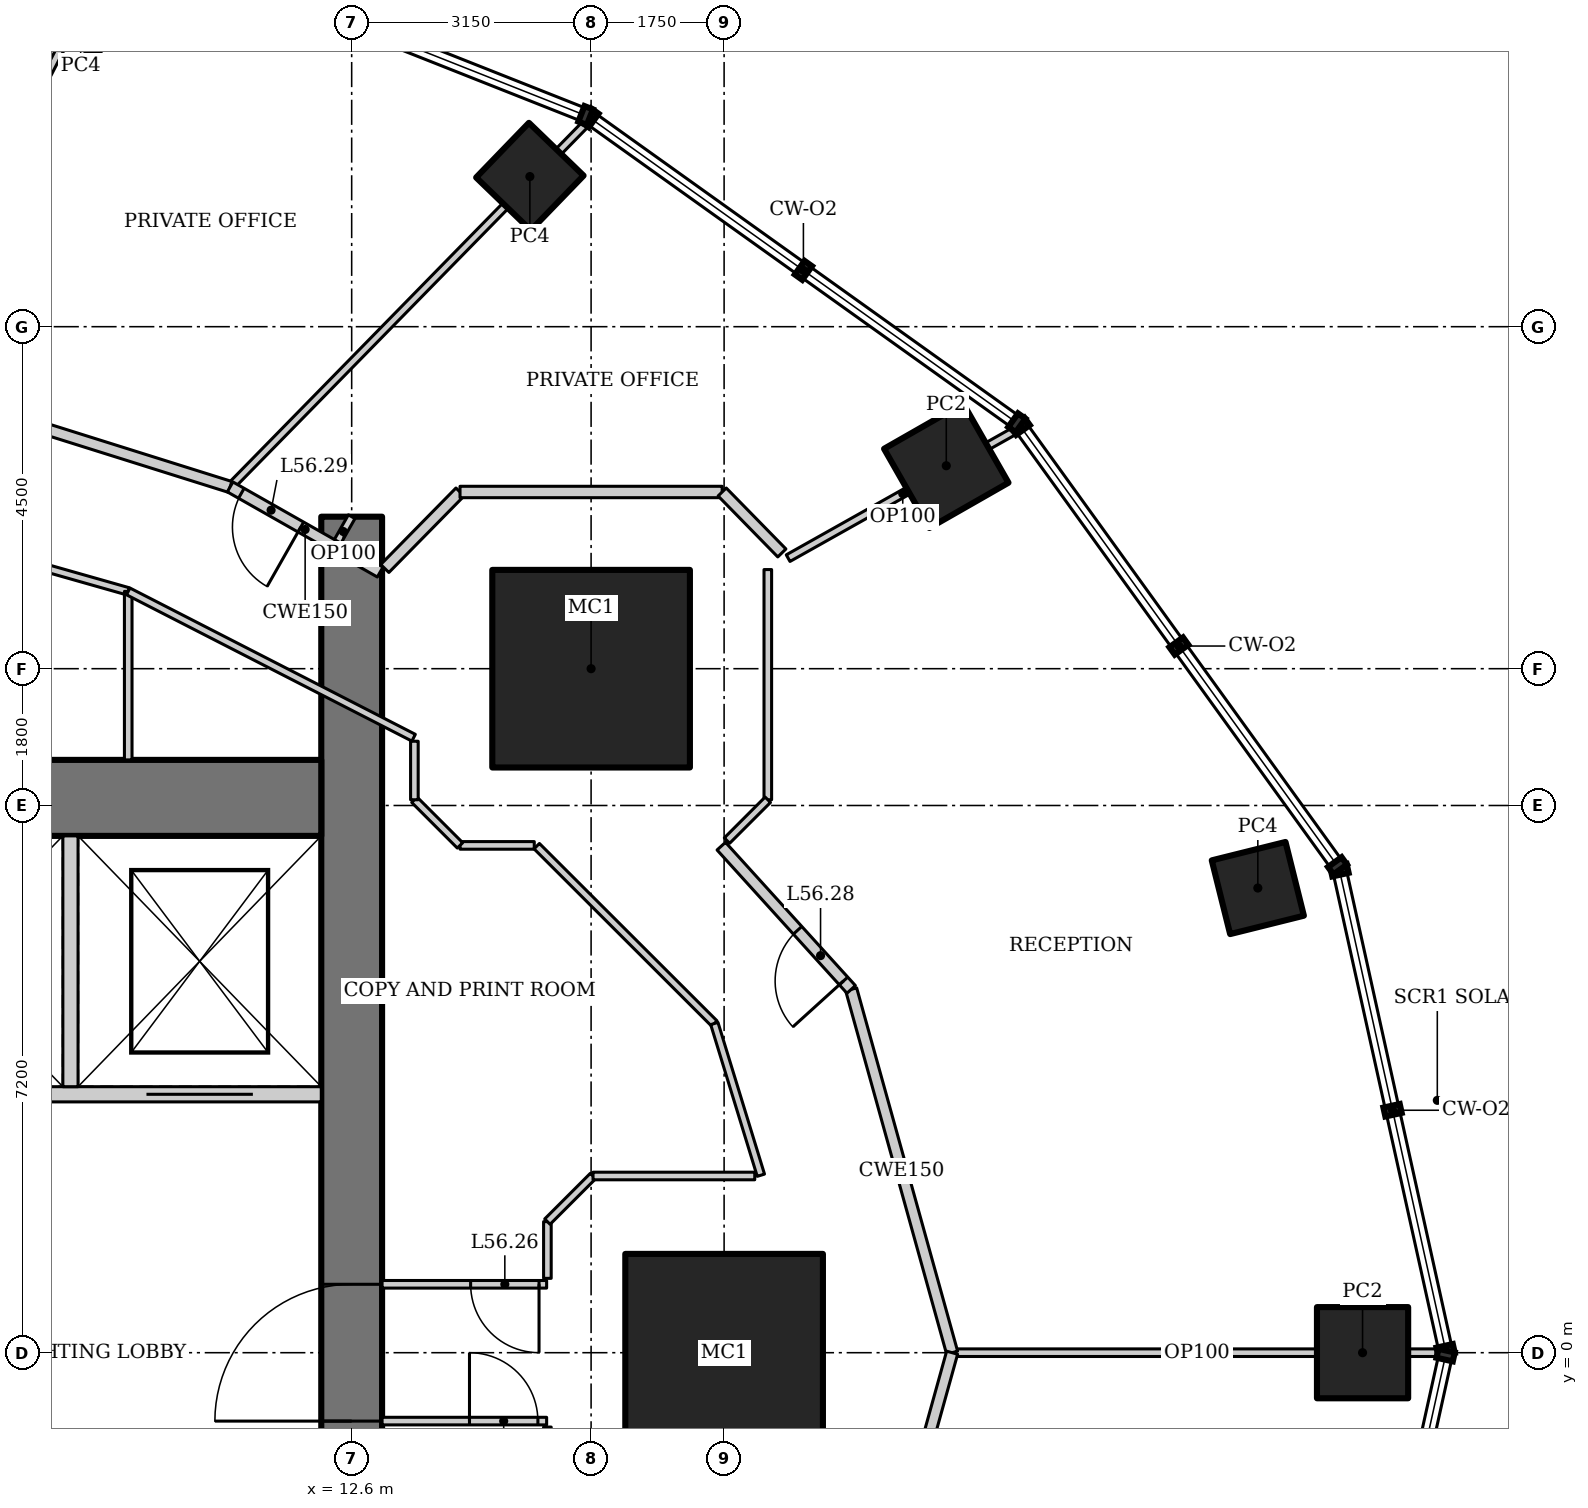
"""IFC4 building model, lengths in metres.
Left out: names, types, materials, properties, quantities, classifications, styles, units other than length and angle.
Written with IfcOpenShell. Run it as: python <this file> out.ifc"""

import sys

from ifc_helpers import new_model, si_unit, direction, frame, frame_2d, origin, origin_2d, place, context, subcontext, project, spatial, rectangle, hollow_rectangle, extrude, element, fill, save


model = new_model("IFC4")
c1 = context("Model", 3, precision=1e-05, world=origin(), true_north=direction((0.0, 1.0)))
c2 = subcontext(c1, "Body", "Model", "MODEL_VIEW")
j1 = project(units=[si_unit("LENGTHUNIT", "METRE"), si_unit("PLANEANGLEUNIT", "RADIAN")], contexts=[c1])
p1 = place(None, origin())
s1 = spatial("IfcSite", under=j1, at=p1, CompositionType="ELEMENT")
p2 = place(p1, origin())
s2 = spatial("IfcBuilding", under=s1, at=p2, CompositionType="ELEMENT")
p3 = place(p2, frame((0.0, 0.0, 241.0)))
s3 = spatial("IfcBuildingStorey", under=s2, at=p3, CompositionType="ELEMENT", Elevation=241.0)
for number, where, z_axis, x_axis in (
    (1, (17.5, 0.0, 0.0), (0.0, 0.0, 1.0), (1.0, 0.0, 0.0)),
    (2, (15.75, 9.0, 0.0), (0.0, 0.0, 1.0), (1.0, 0.0, 0.0)),
):
    element("IfcColumn", number, at=place(p3, frame(where, z_axis=z_axis, x_axis=x_axis)), inside=s3, PredefinedType="COLUMN", context=c2, shape_type="SweptSolid", body=[
        extrude(hollow_rectangle(XDim=2.6, YDim=2.6, WallThickness=0.13, at=origin_2d()), origin(), (0.0, 0.0, 1.0), 4.2),
    ])
p4 = place(p3, frame((25.9, 0.0, 0.0), z_axis=(0.0, 0.0, 1.0), x_axis=(1.0, 0.0, 0.0)))
e3 = element("IfcColumn", 3, at=p4, inside=s3, PredefinedType="COLUMN", context=c2, shape_type="SweptSolid", body=[
    extrude(hollow_rectangle(XDim=1.2, YDim=1.2, WallThickness=0.1, at=origin_2d()), origin(), (0.0, 0.0, 1.0), 4.2),
])
p5 = place(p3, frame((24.522, 6.114, 0.0), z_axis=(0.0, 0.0, 1.0), x_axis=(0.970295726276, 0.2419218956, 0.0)))
e4 = element("IfcColumn", 4, at=p5, inside=s3, PredefinedType="COLUMN", context=c2, shape_type="SweptSolid", body=[
    extrude(hollow_rectangle(XDim=1.0, YDim=1.0, WallThickness=0.08, at=origin_2d()), origin(), (0.0, 0.0, 1.0), 4.2),
])
p6 = place(p3, frame((20.423, 11.67, 0.0), z_axis=(0.0, 0.0, 1.0), x_axis=(0.86824298017, 0.496139221777, 0.0)))
e5 = element("IfcColumn", 5, at=p6, inside=s3, PredefinedType="COLUMN", context=c2, shape_type="SweptSolid", body=[
    extrude(hollow_rectangle(XDim=1.2, YDim=1.2, WallThickness=0.1, at=origin_2d()), origin(), (0.0, 0.0, 1.0), 4.2),
])
for number, where, z_axis, x_axis in (
    (6, (14.944, 15.475, 0.0), (0.0, 0.0, 1.0), (0.695, 0.719, 0.0)),
    (7, (9.035, 17.731, 0.0), (0.0, 0.0, 1.0), (0.454, 0.891, 0.0)),
):
    element("IfcColumn", number, at=place(p3, frame(where, z_axis=z_axis, x_axis=x_axis)), inside=s3, PredefinedType="COLUMN", context=c2, shape_type="SweptSolid", body=[
        extrude(hollow_rectangle(XDim=1.0, YDim=1.0, WallThickness=0.08, at=origin_2d()), origin(), (0.0, 0.0, 1.0), 4.2),
    ])
p7 = place(p3, frame((12.6, -11.0, 0.0), z_axis=(0.0, 0.0, 1.0), x_axis=(0.0, 1.0, 0.0)))
e8 = element("IfcWall", 8, at=p7, inside=s3, PredefinedType="SHEAR", context=c2, shape_type="SweptSolid", body=[
    extrude(rectangle(XDim=22.0, YDim=0.8, at=frame_2d((11.0, 0.0))), origin(), (0.0, 0.0, 1.0), 4.2),
])
p8 = place(p7, frame((10.1, 0.0, 0.0)))
e9 = element("IfcOpeningElement", 9, at=p8, cuts=e8, PredefinedType="OPENING", context=c2, shape_type="SweptSolid", body=[
    extrude(rectangle(XDim=1.8, YDim=2.1, at=frame_2d((0.9, 1.05))), frame((0.0, 0.41, 0.0), z_axis=(0.0, -1.0, 0.0), x_axis=(1.0, 0.0, 0.0)), (0.0, 0.0, 1.0), 0.82),
])
p9 = place(p3, frame((12.2, 7.3, 0.0), z_axis=(0.0, 0.0, 1.0), x_axis=(-1.0, 0.0, 0.0)))
e10 = element("IfcWall", 10, at=p9, inside=s3, PredefinedType="SHEAR", context=c2, shape_type="SweptSolid", body=[
    extrude(rectangle(XDim=6.6, YDim=1.0, at=frame_2d((3.3, 0.0))), origin(), (0.0, 0.0, 1.0), 4.2),
])
p10 = place(p3, frame((12.2, 3.4, 0.0), z_axis=(0.0, 0.0, 1.0), x_axis=(-1.0, 0.0, 0.0)))
e11 = element("IfcWall", 11, at=p10, inside=s3, PredefinedType="SOLIDWALL", context=c2, shape_type="SweptSolid", body=[
    extrude(rectangle(XDim=6.6, YDim=0.2, at=frame_2d((3.3, 0.0))), origin(), (0.0, 0.0, 1.0), 4.2),
])
p11 = place(p10, frame((4.45, 0.0, 0.0)))
e12 = element("IfcOpeningElement", 12, at=p11, cuts=e11, PredefinedType="OPENING", context=c2, shape_type="SweptSolid", body=[
    extrude(rectangle(XDim=1.1, YDim=2.2, at=frame_2d((0.55, 1.1))), frame((0.0, 0.11, 0.0), z_axis=(0.0, -1.0, 0.0), x_axis=(1.0, 0.0, 0.0)), (0.0, 0.0, 1.0), 0.22),
])
p12 = place(p10, frame((0.9, 0.0, 0.0)))
e13 = element("IfcOpeningElement", 13, at=p12, cuts=e11, PredefinedType="OPENING", context=c2, shape_type="SweptSolid", body=[
    extrude(rectangle(XDim=1.4, YDim=2.2, at=frame_2d((0.7, 1.1))), frame((0.0, 0.11, 0.0), z_axis=(0.0, -1.0, 0.0), x_axis=(1.0, 0.0, 0.0)), (0.0, 0.0, 1.0), 0.22),
])
p13 = place(p3, frame((8.9, 3.5, 0.0), z_axis=(0.0, 0.0, 1.0), x_axis=(0.0, 1.0, 0.0)))
e14 = element("IfcWall", 14, at=p13, inside=s3, PredefinedType="SOLIDWALL", context=c2, shape_type="SweptSolid", body=[
    extrude(rectangle(XDim=3.3, YDim=0.2, at=frame_2d((1.65, 0.0))), origin(), (0.0, 0.0, 1.0), 4.2),
])
p14 = place(p3, frame((26.944, 0.0, 0.0), z_axis=(0.0, 0.0, 1.0), x_axis=(-1.0, 0.0, 0.0)))
e15 = element("IfcWall", 15, at=p14, inside=s3, PredefinedType="PARTITIONING", context=c2, shape_type="SweptSolid", body=[
    extrude(rectangle(XDim=6.444, YDim=0.1, at=frame_2d((3.222, 0.0))), origin(), (0.0, 0.0, 1.0), 3.349),
])
p15 = place(p3, frame((15.709, 16.199, 0.0), z_axis=(0.0, 0.0, 1.0), x_axis=(-0.699758297028, -0.71437967898, 0.0)))
e16 = element("IfcWall", 16, at=p15, inside=s3, PredefinedType="PARTITIONING", context=c2, shape_type="SweptSolid", body=[
    extrude(rectangle(XDim=6.729, YDim=0.1, at=frame_2d((3.365, 0.0))), origin(), (0.0, 0.0, 1.0), 3.41),
])
p16 = place(p3, frame((9.54, 18.65, 0.0), z_axis=(0.0, 0.0, 1.0), x_axis=(-0.458420942987, -0.888735190611, 0.0)))
e17 = element("IfcWall", 17, at=p16, inside=s3, PredefinedType="PARTITIONING", context=c2, shape_type="SweptSolid", body=[
    extrude(rectangle(XDim=6.584, YDim=0.1, at=frame_2d((3.292, 0.0))), origin(), (0.0, 0.0, 1.0), 3.108),
])
p17 = place(p3, frame((20.5, 0.0, 0.0), z_axis=(0.0, 0.0, 1.0), x_axis=(-0.26770731566, 0.963500281859, 0.0)))
e18 = element("IfcWall", 18, at=p17, inside=s3, PredefinedType="PARTITIONING", context=c2, shape_type="SweptSolid", body=[
    extrude(rectangle(XDim=4.961, YDim=0.15, at=frame_2d((2.48, 0.0))), origin(), (0.0, 0.0, 1.0), 4.05),
])
p18 = place(p3, frame((11.001, 11.392, 0.0), z_axis=(0.0, 0.0, 1.0), x_axis=(-0.954031103669, 0.299707612903, 0.0)))
e19 = element("IfcWall", 19, at=p18, inside=s3, PredefinedType="PARTITIONING", context=c2, shape_type="SweptSolid", body=[
    extrude(rectangle(XDim=4.695, YDim=0.15, at=frame_2d((2.348, 0.0))), origin(), (0.0, 0.0, 1.0), 4.05),
])
p19 = place(p18, frame((3.645, 0.0, 0.0)))
e20 = element("IfcOpeningElement", 20, at=p19, cuts=e19, PredefinedType="OPENING", context=c2, shape_type="SweptSolid", body=[
    extrude(rectangle(XDim=0.9, YDim=2.1, at=frame_2d((0.45, 1.05))), frame((0.0, 0.085, 0.0), z_axis=(0.0, -1.0, 0.0), x_axis=(1.0, 0.0, 0.0)), (0.0, 0.0, 1.0), 0.17),
])
p20 = place(p3, frame((19.172, -4.78, 0.0), z_axis=(0.0, 0.0, 1.0), x_axis=(0.26770731566, 0.963500281859, 0.0)))
e21 = element("IfcWall", 21, at=p20, inside=s3, PredefinedType="PARTITIONING", context=c2, shape_type="SweptSolid", body=[
    extrude(rectangle(XDim=4.961, YDim=0.15, at=frame_2d((2.48, 0.0))), origin(), (0.0, 0.0, 1.0), 4.05),
])
p21 = place(p20, frame((0.15, 0.0, 0.0)))
e22 = element("IfcOpeningElement", 22, at=p21, cuts=e21, PredefinedType="OPENING", context=c2, shape_type="SweptSolid", body=[
    extrude(rectangle(XDim=0.9, YDim=2.1, at=frame_2d((0.45, 1.05))), frame((0.0, 0.085, 0.0), z_axis=(0.0, -1.0, 0.0), x_axis=(1.0, 0.0, 0.0)), (0.0, 0.0, 1.0), 0.17),
])
p22 = place(p3, frame((5.68, 11.147, 0.0), z_axis=(0.0, 0.0, 1.0), x_axis=(0.961970251804, -0.27315423234, 0.0)))
e23 = element("IfcWall", 23, at=p22, inside=s3, PredefinedType="PARTITIONING", context=c2, shape_type="SweptSolid", body=[
    extrude(rectangle(XDim=4.137, YDim=0.1, at=frame_2d((2.069, 0.0))), origin(), (0.0, 0.0, 1.0), 4.05),
])
p23 = place(p3, frame((9.66, 10.017, 0.0), z_axis=(0.0, 0.0, 1.0), x_axis=(0.0, -1.0, 0.0)))
e24 = element("IfcWall", 24, at=p23, inside=s3, PredefinedType="PARTITIONING", context=c2, shape_type="SweptSolid", body=[
    extrude(rectangle(XDim=2.217, YDim=0.1, at=frame_2d((1.108, 0.0))), origin(), (0.0, 0.0, 1.0), 4.05),
])
p24 = place(p3, frame((12.6, 11.0, 0.0), z_axis=(0.0, 0.0, 1.0), x_axis=(-0.493794495037, -0.869578631678, 0.0)))
e25 = element("IfcWall", 25, at=p24, inside=s3, PredefinedType="PARTITIONING", context=c2, shape_type="SweptSolid", body=[
    extrude(rectangle(XDim=0.449, YDim=0.1, at=frame_2d((0.225, 0.0))), origin(), (0.0, 0.0, 1.0), 4.05),
])
p25 = place(p3, frame((21.358, 12.15, 0.0), z_axis=(0.0, 0.0, 1.0), x_axis=(-0.871730019583, -0.489986502832, 0.0)))
e26 = element("IfcWall", 26, at=p25, inside=s3, PredefinedType="PARTITIONING", context=c2, shape_type="SweptSolid", body=[
    extrude(rectangle(XDim=3.46, YDim=0.1, at=frame_2d((1.73, 0.0))), origin(), (0.0, 0.0, 1.0), 3.524),
])
p26 = place(p3, frame((19.172, 4.78, 0.0), z_axis=(0.0, 0.0, 1.0), x_axis=(-0.671721890643, 0.74080341632, 0.0)))
e27 = element("IfcWall", 27, at=p26, inside=s3, PredefinedType="PARTITIONING", context=c2, shape_type="SweptSolid", body=[
    extrude(rectangle(XDim=2.544, YDim=0.15, at=frame_2d((1.272, 0.0))), origin(), (0.0, 0.0, 1.0), 4.05),
])
p27 = place(p26, frame((0.15, 0.0, 0.0)))
e28 = element("IfcOpeningElement", 28, at=p27, cuts=e27, PredefinedType="OPENING", context=c2, shape_type="SweptSolid", body=[
    extrude(rectangle(XDim=0.9, YDim=2.1, at=frame_2d((0.45, 1.05))), frame((0.0, 0.085, 0.0), z_axis=(0.0, -1.0, 0.0), x_axis=(1.0, 0.0, 0.0)), (0.0, 0.0, 1.0), 0.17),
])
p28 = place(p3, frame((12.975, 10.271, 0.0), z_axis=(0.0, 0.0, 1.0), x_axis=(-0.869722107117, 0.493541747366, 0.0)))
e29 = element("IfcWall", 29, at=p28, inside=s3, PredefinedType="PARTITIONING", context=c2, shape_type="SweptSolid", body=[
    extrude(rectangle(XDim=2.27, YDim=0.15, at=frame_2d((1.135, 0.0))), origin(), (0.0, 0.0, 1.0), 4.05),
])
p29 = place(p28, frame((1.2, 0.0, 0.0)))
e30 = element("IfcOpeningElement", 30, at=p29, cuts=e29, PredefinedType="OPENING", context=c2, shape_type="SweptSolid", body=[
    extrude(rectangle(XDim=0.9, YDim=2.1, at=frame_2d((0.45, 1.05))), frame((0.0, 0.085, 0.0), z_axis=(0.0, -1.0, 0.0), x_axis=(1.0, 0.0, 0.0)), (0.0, 0.0, 1.0), 0.17),
])
p30 = place(p3, frame((9.66, 10.017, 0.0), z_axis=(0.0, 0.0, 1.0), x_axis=(0.889833724874, -0.456284935185, 0.0)))
e31 = element("IfcWall", 31, at=p30, inside=s3, PredefinedType="PARTITIONING", context=c2, shape_type="SweptSolid", body=[
    extrude(rectangle(XDim=4.22, YDim=0.1, at=frame_2d((2.11, 0.0))), origin(), (0.0, 0.0, 1.0), 4.05),
])
p31 = place(p3, frame((15.035, 6.665, 0.0), z_axis=(0.0, 0.0, 1.0), x_axis=(0.707587114823, -0.70662612104, 0.0)))
e32 = element("IfcWall", 32, at=p31, inside=s3, PredefinedType="PARTITIONING", context=c2, shape_type="SweptSolid", body=[
    extrude(rectangle(XDim=3.303, YDim=0.1, at=frame_2d((1.651, 0.0))), origin(), (0.0, 0.0, 1.0), 4.05),
])
p32 = place(p3, frame((15.002, 6.675, 0.0), z_axis=(0.0, 0.0, 1.0), x_axis=(-1.0, 0.0, 0.0)))
e33 = element("IfcWall", 33, at=p32, inside=s3, PredefinedType="PARTITIONING", context=c2, shape_type="SweptSolid", body=[
    extrude(rectangle(XDim=0.977, YDim=0.1, at=frame_2d((0.488, 0.0))), origin(), (0.0, 0.0, 1.0), 4.05),
])
p33 = place(p3, frame((14.025, 6.675, 0.0), z_axis=(0.0, 0.0, 1.0), x_axis=(-0.707106781187, 0.707106781187, 0.0)))
e34 = element("IfcWall", 34, at=p33, inside=s3, PredefinedType="PARTITIONING", context=c2, shape_type="SweptSolid", body=[
    extrude(rectangle(XDim=0.849, YDim=0.1, at=frame_2d((0.425, 0.0))), origin(), (0.0, 0.0, 1.0), 4.05),
])
p34 = place(p3, frame((13.425, 7.275, 0.0), z_axis=(0.0, 0.0, 1.0), x_axis=(0.0, 1.0, 0.0)))
e35 = element("IfcWall", 35, at=p34, inside=s3, PredefinedType="PARTITIONING", context=c2, shape_type="SweptSolid", body=[
    extrude(rectangle(XDim=0.77, YDim=0.1, at=frame_2d((0.385, 0.0))), origin(), (0.0, 0.0, 1.0), 4.05),
])
p35 = place(p3, frame((18.075, 10.304, 0.0), z_axis=(0.0, 0.0, 1.0), x_axis=(0.0, -1.0, 0.0)))
e36 = element("IfcWall", 36, at=p35, inside=s3, PredefinedType="PARTITIONING", context=c2, shape_type="SweptSolid", body=[
    extrude(rectangle(XDim=3.029, YDim=0.1, at=frame_2d((1.514, 0.0))), origin(), (0.0, 0.0, 1.0), 3.6),
])
p36 = place(p3, frame((18.075, 7.275, 0.0), z_axis=(0.0, 0.0, 1.0), x_axis=(-0.707106781187, -0.707106781187, 0.0)))
e37 = element("IfcWall", 37, at=p36, inside=s3, PredefinedType="PARTITIONING", context=c2, shape_type="SweptSolid", body=[
    extrude(rectangle(XDim=0.76, YDim=0.1, at=frame_2d((0.38, 0.0))), origin(), (0.0, 0.0, 1.0), 4.05),
])
p37 = place(p3, frame((13.036, 10.319, 0.0), z_axis=(0.0, 0.0, 1.0), x_axis=(0.701113567316, 0.713049623606, 0.0)))
e38 = element("IfcWall", 38, at=p37, inside=s3, PredefinedType="PARTITIONING", context=c2, shape_type="SweptSolid", body=[
    extrude(rectangle(XDim=1.411, YDim=0.15, at=frame_2d((0.706, 0.0))), origin(), (0.0, 0.0, 1.0), 4.05),
])
p38 = place(p3, frame((14.025, 11.325, 0.0), z_axis=(0.0, 0.0, 1.0), x_axis=(1.0, 0.0, 0.0)))
e39 = element("IfcWall", 39, at=p38, inside=s3, PredefinedType="PARTITIONING", context=c2, shape_type="SweptSolid", body=[
    extrude(rectangle(XDim=3.449, YDim=0.15, at=frame_2d((1.725, 0.0))), origin(), (0.0, 0.0, 1.0), 4.05),
])
p39 = place(p3, frame((17.475, 11.325, 0.0), z_axis=(0.0, 0.0, 1.0), x_axis=(0.699453593529, -0.714678018761, 0.0)))
e40 = element("IfcWall", 40, at=p39, inside=s3, PredefinedType="PARTITIONING", context=c2, shape_type="SweptSolid", body=[
    extrude(rectangle(XDim=1.123, YDim=0.15, at=frame_2d((0.561, 0.0))), origin(), (0.0, 0.0, 1.0), 4.05),
])
p40 = place(p3, frame((13.0, -0.9, 0.0), z_axis=(0.0, 0.0, 1.0), x_axis=(1.0, 0.0, 0.0)))
e41 = element("IfcWall", 41, at=p40, inside=s3, PredefinedType="PARTITIONING", context=c2, shape_type="SweptSolid", body=[
    extrude(rectangle(XDim=2.165, YDim=0.1, at=frame_2d((1.083, 0.0))), origin(), (0.0, 0.0, 1.0), 4.05),
])
p41 = place(p40, frame((1.15, 0.0, 0.0)))
e42 = element("IfcOpeningElement", 42, at=p41, cuts=e41, PredefinedType="OPENING", context=c2, shape_type="SweptSolid", body=[
    extrude(rectangle(XDim=0.9, YDim=2.1, at=frame_2d((0.45, 1.05))), frame((0.0, 0.06, 0.0), z_axis=(0.0, -1.0, 0.0), x_axis=(1.0, 0.0, 0.0)), (0.0, 0.0, 1.0), 0.12),
])
p42 = place(p3, frame((17.372, 4.331, 0.0), z_axis=(0.0, 0.0, 1.0), x_axis=(0.293231279211, -0.956041535129, 0.0)))
e43 = element("IfcWall", 43, at=p42, inside=s3, PredefinedType="PARTITIONING", context=c2, shape_type="SweptSolid", body=[
    extrude(rectangle(XDim=2.088, YDim=0.1, at=frame_2d((1.044, 0.0))), origin(), (0.0, 0.0, 1.0), 4.05),
])
p43 = place(p3, frame((15.165, 0.9, 0.0), z_axis=(0.0, 0.0, 1.0), x_axis=(-1.0, 0.0, 0.0)))
e44 = element("IfcWall", 44, at=p43, inside=s3, PredefinedType="PARTITIONING", context=c2, shape_type="SweptSolid", body=[
    extrude(rectangle(XDim=2.165, YDim=0.1, at=frame_2d((1.083, 0.0))), origin(), (0.0, 0.0, 1.0), 4.05),
])
p44 = place(p43, frame((0.1, 0.0, 0.0)))
e45 = element("IfcOpeningElement", 45, at=p44, cuts=e44, PredefinedType="OPENING", context=c2, shape_type="SweptSolid", body=[
    extrude(rectangle(XDim=0.9, YDim=2.1, at=frame_2d((0.45, 1.05))), frame((0.0, 0.06, 0.0), z_axis=(0.0, -1.0, 0.0), x_axis=(1.0, 0.0, 0.0)), (0.0, 0.0, 1.0), 0.12),
])
for number, where, z_axis, x_axis in (
    (46, (15.175, -1.725, 0.0), (0.0, 0.0, 1.0), (0.0, 1.0, 0.0)),
    (47, (15.175, 0.978, 0.0), (0.0, 0.0, 1.0), (0.0, 1.0, 0.0)),
):
    element("IfcWall", number, at=place(p3, frame(where, z_axis=z_axis, x_axis=x_axis)), inside=s3, PredefinedType="PARTITIONING", context=c2, shape_type="SweptSolid", body=[
        extrude(rectangle(XDim=0.746, YDim=0.1, at=frame_2d((0.373, 0.0))), origin(), (0.0, 0.0, 1.0), 4.05),
    ])
p45 = place(p3, frame((15.175, 1.725, 0.0), z_axis=(0.0, 0.0, 1.0), x_axis=(0.707106781187, 0.707106781187, 0.0)))
e48 = element("IfcWall", 48, at=p45, inside=s3, PredefinedType="PARTITIONING", context=c2, shape_type="SweptSolid", body=[
    extrude(rectangle(XDim=0.849, YDim=0.1, at=frame_2d((0.425, 0.0))), origin(), (0.0, 0.0, 1.0), 4.05),
])
p46 = place(p3, frame((15.775, 2.325, 0.0), z_axis=(0.0, 0.0, 1.0), x_axis=(1.0, 0.0, 0.0)))
e49 = element("IfcWall", 49, at=p46, inside=s3, PredefinedType="PARTITIONING", context=c2, shape_type="SweptSolid", body=[
    extrude(rectangle(XDim=2.128, YDim=0.1, at=frame_2d((1.064, 0.0))), origin(), (0.0, 0.0, 1.0), 4.05),
])
p47 = place(p8, origin())
e50 = element("IfcDoor", 50, at=p47, inside=s3, OperationType="DOUBLE_DOOR_DOUBLE_SWING", PredefinedType="DOOR", context=c2, shape_type="SweptSolid", body=[
    extrude(rectangle(XDim=1.8, YDim=2.1, at=frame_2d((0.9, 1.05))), frame((0.0, 0.025, 0.0), z_axis=(0.0, -1.0, 0.0), x_axis=(1.0, 0.0, 0.0)), (0.0, 0.0, 1.0), 0.05),
])
fill(e9, e50)
p48 = place(p12, origin())
e51 = element("IfcDoor", 51, at=p48, inside=s3, OperationType="DOUBLE_DOOR_SLIDING", PredefinedType="DOOR", context=c2, shape_type="SweptSolid", body=[
    extrude(rectangle(XDim=1.4, YDim=2.2, at=frame_2d((0.7, 1.1))), frame((0.0, 0.025, 0.0), z_axis=(0.0, -1.0, 0.0), x_axis=(1.0, 0.0, 0.0)), (0.0, 0.0, 1.0), 0.05),
])
fill(e13, e51)
p49 = place(p41, origin())
e52 = element("IfcDoor", 52, at=p49, inside=s3, OperationType="SINGLE_SWING_LEFT", PredefinedType="DOOR", context=c2, shape_type="SweptSolid", body=[
    extrude(rectangle(XDim=0.9, YDim=2.1, at=frame_2d((0.45, 1.05))), frame((0.0, 0.025, 0.0), z_axis=(0.0, -1.0, 0.0), x_axis=(1.0, 0.0, 0.0)), (0.0, 0.0, 1.0), 0.05),
])
fill(e42, e52)
p50 = place(p44, origin())
e53 = element("IfcDoor", 53, at=p50, inside=s3, OperationType="SINGLE_SWING_LEFT", PredefinedType="DOOR", context=c2, shape_type="SweptSolid", body=[
    extrude(rectangle(XDim=0.9, YDim=2.1, at=frame_2d((0.45, 1.05))), frame((0.0, 0.025, 0.0), z_axis=(0.0, -1.0, 0.0), x_axis=(1.0, 0.0, 0.0)), (0.0, 0.0, 1.0), 0.05),
])
fill(e45, e53)
p51 = place(p27, origin())
e54 = element("IfcDoor", 54, at=p51, inside=s3, OperationType="SINGLE_SWING_LEFT", PredefinedType="DOOR", context=c2, shape_type="SweptSolid", body=[
    extrude(rectangle(XDim=0.9, YDim=2.1, at=frame_2d((0.45, 1.05))), frame((0.0, 0.025, 0.0), z_axis=(0.0, -1.0, 0.0), x_axis=(1.0, 0.0, 0.0)), (0.0, 0.0, 1.0), 0.05),
])
fill(e28, e54)
p52 = place(p29, origin())
e55 = element("IfcDoor", 55, at=p52, inside=s3, OperationType="SINGLE_SWING_LEFT", PredefinedType="DOOR", context=c2, shape_type="SweptSolid", body=[
    extrude(rectangle(XDim=0.9, YDim=2.1, at=frame_2d((0.45, 1.05))), frame((0.0, 0.025, 0.0), z_axis=(0.0, -1.0, 0.0), x_axis=(1.0, 0.0, 0.0)), (0.0, 0.0, 1.0), 0.05),
])
fill(e30, e55)
save(model, sys.argv[1])
